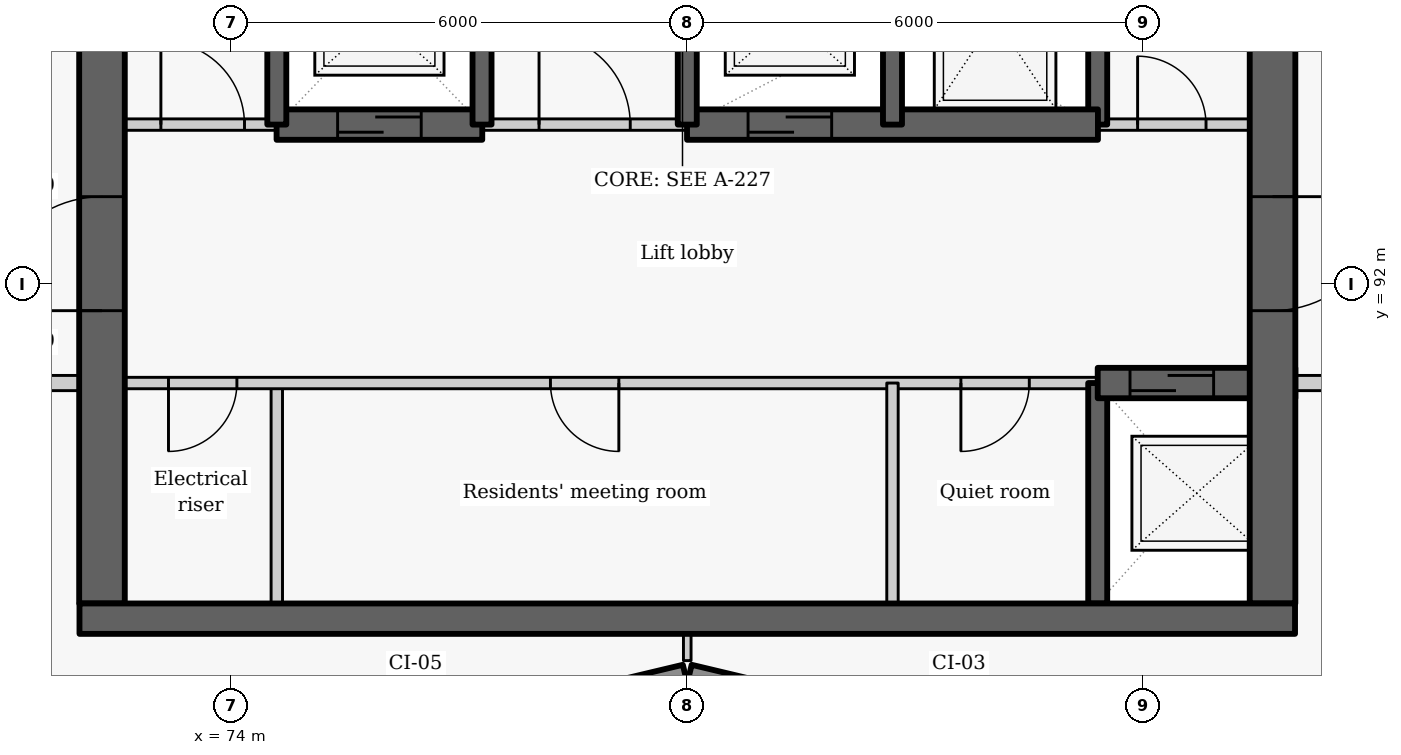
"""IFC4 building model, lengths in metres.
Left out: names, types, materials, properties, quantities, classifications, styles, units other than length and angle.
Written with IfcOpenShell. Run it as: python <this file> out.ifc"""

import sys

from ifc_helpers import new_model, si_unit, direction, frame, frame_2d, origin, place, context, subcontext, project, spatial, rectangle, extrude, element, fill, save


model = new_model("IFC4")
c1 = context("Model", 3, precision=1e-05, world=origin(), true_north=direction((0.0, 1.0)))
c2 = subcontext(c1, "Body", "Model", "MODEL_VIEW")
j1 = project(units=[si_unit("LENGTHUNIT", "METRE"), si_unit("PLANEANGLEUNIT", "RADIAN")], contexts=[c1])
p1 = place(None, origin())
s1 = spatial("IfcSite", under=j1, at=p1, CompositionType="ELEMENT")
p2 = place(p1, origin())
s2 = spatial("IfcBuilding", under=s1, at=p2, CompositionType="ELEMENT")
p3 = place(p2, frame((0.0, 0.0, 150.3)))
s3 = spatial("IfcBuildingStorey", under=s2, at=p3, CompositionType="ELEMENT", Elevation=150.3)
p4 = place(p3, frame((76.814, 86.119, 0.0), z_axis=(0.0, 0.0, 1.0), x_axis=(0.972773113459, 0.231759508395, 0.0)))
e1 = element("IfcWall", 1, at=p4, inside=s3, PredefinedType="SOLIDWALL", context=c2, shape_type="SweptSolid", body=[
    extrude(rectangle(XDim=3.246, YDim=0.25, at=frame_2d((1.623, 0.0))), origin(), (0.0, 0.0, 1.0), 2.425),
])
p5 = place(p4, frame((0.573, 0.0, 0.9)))
e2 = element("IfcOpeningElement", 2, at=p5, cuts=e1, PredefinedType="OPENING", context=c2, shape_type="SweptSolid", body=[
    extrude(rectangle(XDim=2.1, YDim=1.1, at=frame_2d((1.05, 0.55))), frame((0.0, 0.135, 0.0), z_axis=(0.0, -1.0, 0.0), x_axis=(1.0, 0.0, 0.0)), (0.0, 0.0, 1.0), 0.27),
])
p6 = place(p3, frame((80.029, 86.872, 0.0), z_axis=(0.0, 0.0, 1.0), x_axis=(0.972773113459, -0.231759508395, 0.0)))
e3 = element("IfcWall", 3, at=p6, inside=s3, PredefinedType="SOLIDWALL", context=c2, shape_type="SweptSolid", body=[
    extrude(rectangle(XDim=3.246, YDim=0.25, at=frame_2d((1.623, 0.0))), origin(), (0.0, 0.0, 1.0), 2.425),
])
p7 = place(p6, frame((0.573, 0.0, 0.9)))
e4 = element("IfcOpeningElement", 4, at=p7, cuts=e3, PredefinedType="OPENING", context=c2, shape_type="SweptSolid", body=[
    extrude(rectangle(XDim=2.1, YDim=1.1, at=frame_2d((1.05, 0.55))), frame((0.0, 0.135, 0.0), z_axis=(0.0, -1.0, 0.0), x_axis=(1.0, 0.0, 0.0)), (0.0, 0.0, 1.0), 0.27),
])
p8 = place(p3, frame((74.6, 87.8, 0.0), z_axis=(0.0, 0.0, 1.0), x_axis=(0.0, 1.0, 0.0)))
e5 = element("IfcWall", 5, at=p8, inside=s3, PredefinedType="PARTITIONING", context=c2, shape_type="SweptSolid", body=[
    extrude(rectangle(XDim=2.9, YDim=0.15, at=frame_2d((1.45, 0.0))), origin(), (0.0, 0.0, 1.0), 3.025),
])
p9 = place(p3, frame((85.4, 90.7, 0.0), z_axis=(0.0, 0.0, 1.0), x_axis=(-1.0, 0.0, 0.0)))
e6 = element("IfcWall", 6, at=p9, inside=s3, PredefinedType="PARTITIONING", context=c2, shape_type="SweptSolid", body=[
    extrude(rectangle(XDim=13.4, YDim=0.15, at=frame_2d((6.7, 0.0))), origin(), (0.0, 0.0, 1.0), 3.025),
])
p10 = place(p9, frame((11.325, 0.0, 0.0)))
e7 = element("IfcOpeningElement", 7, at=p10, cuts=e6, PredefinedType="OPENING", context=c2, shape_type="SweptSolid", body=[
    extrude(rectangle(XDim=0.9, YDim=2.1, at=frame_2d((0.45, 1.05))), frame((0.0, 0.085, 0.0), z_axis=(0.0, -1.0, 0.0), x_axis=(1.0, 0.0, 0.0)), (0.0, 0.0, 1.0), 0.17),
])
p11 = place(p9, frame((6.3, 0.0, 0.0)))
e8 = element("IfcOpeningElement", 8, at=p11, cuts=e6, PredefinedType="OPENING", context=c2, shape_type="SweptSolid", body=[
    extrude(rectangle(XDim=0.9, YDim=2.1, at=frame_2d((0.45, 1.05))), frame((0.0, 0.085, 0.0), z_axis=(0.0, -1.0, 0.0), x_axis=(1.0, 0.0, 0.0)), (0.0, 0.0, 1.0), 0.17),
])
p12 = place(p9, frame((0.9, 0.0, 0.0)))
e9 = element("IfcOpeningElement", 9, at=p12, cuts=e6, PredefinedType="OPENING", context=c2, shape_type="SweptSolid", body=[
    extrude(rectangle(XDim=0.9, YDim=2.1, at=frame_2d((0.45, 1.05))), frame((0.0, 0.085, 0.0), z_axis=(0.0, -1.0, 0.0), x_axis=(1.0, 0.0, 0.0)), (0.0, 0.0, 1.0), 0.17),
])
p13 = place(p3, frame((72.3, 87.8, -0.275), z_axis=(0.0, 0.0, 1.0), x_axis=(0.0, 1.0, 0.0)))
e10 = element("IfcWall", 10, at=p13, inside=s3, PredefinedType="SHEAR", context=c2, shape_type="SweptSolid", body=[
    extrude(rectangle(XDim=9.1, YDim=0.6, at=frame_2d((4.55, 0.0))), origin(), (0.0, 0.0, 1.0), 3.3),
])
p14 = place(p13, frame((3.852, 0.0, 0.275)))
e11 = element("IfcOpeningElement", 11, at=p14, cuts=e10, PredefinedType="OPENING", context=c2, shape_type="SweptSolid", body=[
    extrude(rectangle(XDim=1.5, YDim=2.1, at=frame_2d((0.75, 1.05))), frame((0.0, 0.31, 0.0), z_axis=(0.0, -1.0, 0.0), x_axis=(1.0, 0.0, 0.0)), (0.0, 0.0, 1.0), 0.62),
])
p15 = place(p3, frame((85.4, 87.8, -0.275), z_axis=(0.0, 0.0, 1.0), x_axis=(0.0, 1.0, 0.0)))
e12 = element("IfcWall", 12, at=p15, inside=s3, PredefinedType="SHEAR", context=c2, shape_type="SweptSolid", body=[
    extrude(rectangle(XDim=2.9, YDim=0.25, at=frame_2d((1.45, 0.0))), origin(), (0.0, 0.0, 1.0), 3.3),
])
p16 = place(p3, frame((85.4, 94.1, -0.275), z_axis=(0.0, 0.0, 1.0), x_axis=(0.0, 1.0, 0.0)))
e13 = element("IfcWall", 13, at=p16, inside=s3, PredefinedType="SHEAR", context=c2, shape_type="SweptSolid", body=[
    extrude(rectangle(XDim=2.8, YDim=0.25, at=frame_2d((1.4, 0.0))), origin(), (0.0, 0.0, 1.0), 3.3),
])
p17 = place(p3, frame((85.4, 90.7, -0.275), z_axis=(0.0, 0.0, 1.0), x_axis=(1.0, 0.0, 0.0)))
e14 = element("IfcWall", 14, at=p17, inside=s3, PredefinedType="SHEAR", context=c2, shape_type="SweptSolid", body=[
    extrude(rectangle(XDim=2.6, YDim=0.4, at=frame_2d((1.3, 0.0))), origin(), (0.0, 0.0, 1.0), 3.3),
])
p18 = place(p17, frame((0.425, 0.0, 0.275)))
e15 = element("IfcOpeningElement", 15, at=p18, cuts=e14, PredefinedType="OPENING", context=c2, shape_type="SweptSolid", body=[
    extrude(rectangle(XDim=1.1, YDim=2.1, at=frame_2d((0.55, 1.05))), frame((0.0, 0.21, 0.0), z_axis=(0.0, -1.0, 0.0), x_axis=(1.0, 0.0, 0.0)), (0.0, 0.0, 1.0), 0.42),
])
p19 = place(p3, frame((87.7, 103.4, -0.275), z_axis=(0.0, 0.0, 1.0), x_axis=(0.0, -1.0, 0.0)))
e16 = element("IfcWall", 16, at=p19, inside=s3, PredefinedType="SHEAR", context=c2, shape_type="SweptSolid", body=[
    extrude(rectangle(XDim=15.6, YDim=0.6, at=frame_2d((7.8, 0.0))), origin(), (0.0, 0.0, 1.0), 3.3),
])
p20 = place(p19, frame((10.248, 0.0, 0.275)))
e17 = element("IfcOpeningElement", 17, at=p20, cuts=e16, PredefinedType="OPENING", context=c2, shape_type="SweptSolid", body=[
    extrude(rectangle(XDim=1.5, YDim=2.1, at=frame_2d((0.75, 1.05))), frame((0.0, 0.31, 0.0), z_axis=(0.0, -1.0, 0.0), x_axis=(1.0, 0.0, 0.0)), (0.0, 0.0, 1.0), 0.62),
])
p21 = place(p3, frame((82.7, 87.8, 0.0), z_axis=(0.0, 0.0, 1.0), x_axis=(0.0, 1.0, 0.0)))
e18 = element("IfcWall", 18, at=p21, inside=s3, PredefinedType="PARTITIONING", context=c2, shape_type="SweptSolid", body=[
    extrude(rectangle(XDim=2.9, YDim=0.15, at=frame_2d((1.45, 0.0))), origin(), (0.0, 0.0, 1.0), 3.025),
])
p22 = place(p3, frame((72.0, 94.1, 0.0), z_axis=(0.0, 0.0, 1.0), x_axis=(1.0, 0.0, 0.0)))
e19 = element("IfcWall", 19, at=p22, inside=s3, PredefinedType="PARTITIONING", context=c2, shape_type="SweptSolid", body=[
    extrude(rectangle(XDim=2.603, YDim=0.15, at=frame_2d((1.302, 0.0))), origin(), (0.0, 0.0, 1.0), 3.025),
])
p23 = place(p22, frame((1.075, 0.0, 0.0)))
e20 = element("IfcOpeningElement", 20, at=p23, cuts=e19, PredefinedType="OPENING", context=c2, shape_type="SweptSolid", body=[
    extrude(rectangle(XDim=1.1, YDim=2.1, at=frame_2d((0.55, 1.05))), frame((0.0, 0.085, 0.0), z_axis=(0.0, -1.0, 0.0), x_axis=(1.0, 0.0, 0.0)), (0.0, 0.0, 1.0), 0.17),
])
p24 = place(p3, frame((77.297, 94.1, 0.0), z_axis=(0.0, 0.0, 1.0), x_axis=(1.0, 0.0, 0.0)))
e21 = element("IfcWall", 21, at=p24, inside=s3, PredefinedType="PARTITIONING", context=c2, shape_type="SweptSolid", body=[
    extrude(rectangle(XDim=2.706, YDim=0.15, at=frame_2d((1.353, 0.0))), origin(), (0.0, 0.0, 1.0), 3.025),
])
p25 = place(p24, frame((0.753, 0.0, 0.0)))
e22 = element("IfcOpeningElement", 22, at=p25, cuts=e21, PredefinedType="OPENING", context=c2, shape_type="SweptSolid", body=[
    extrude(rectangle(XDim=1.2, YDim=2.1, at=frame_2d((0.6, 1.05))), frame((0.0, 0.085, 0.0), z_axis=(0.0, -1.0, 0.0), x_axis=(1.0, 0.0, 0.0)), (0.0, 0.0, 1.0), 0.17),
])
p26 = place(p3, frame((85.397, 94.1, 0.0), z_axis=(0.0, 0.0, 1.0), x_axis=(1.0, 0.0, 0.0)))
e23 = element("IfcWall", 23, at=p26, inside=s3, PredefinedType="PARTITIONING", context=c2, shape_type="SweptSolid", body=[
    extrude(rectangle(XDim=2.603, YDim=0.15, at=frame_2d((1.302, 0.0))), origin(), (0.0, 0.0, 1.0), 3.025),
])
p27 = place(p26, frame((0.528, 0.0, 0.0)))
e24 = element("IfcOpeningElement", 24, at=p27, cuts=e23, PredefinedType="OPENING", context=c2, shape_type="SweptSolid", body=[
    extrude(rectangle(XDim=0.9, YDim=2.1, at=frame_2d((0.45, 1.05))), frame((0.0, 0.085, 0.0), z_axis=(0.0, -1.0, 0.0), x_axis=(1.0, 0.0, 0.0)), (0.0, 0.0, 1.0), 0.17),
])
p28 = place(p3, frame((74.597, 94.1, -0.275), z_axis=(0.0, 0.0, 1.0), x_axis=(1.0, 0.0, 0.0)))
e25 = element("IfcWall", 25, at=p28, inside=s3, PredefinedType="SHEAR", context=c2, shape_type="SweptSolid", body=[
    extrude(rectangle(XDim=2.706, YDim=0.4, at=frame_2d((1.353, 0.0))), origin(), (0.0, 0.0, 1.0), 3.3),
])
p29 = place(p28, frame((0.803, 0.0, 0.275)))
e26 = element("IfcOpeningElement", 26, at=p29, cuts=e25, PredefinedType="OPENING", context=c2, shape_type="SweptSolid", body=[
    extrude(rectangle(XDim=1.1, YDim=2.1, at=frame_2d((0.55, 1.05))), frame((0.0, 0.21, 0.0), z_axis=(0.0, -1.0, 0.0), x_axis=(1.0, 0.0, 0.0)), (0.0, 0.0, 1.0), 0.42),
])
p30 = place(p3, frame((79.997, 94.1, -0.275), z_axis=(0.0, 0.0, 1.0), x_axis=(1.0, 0.0, 0.0)))
e27 = element("IfcWall", 27, at=p30, inside=s3, PredefinedType="SHEAR", context=c2, shape_type="SweptSolid", body=[
    extrude(rectangle(XDim=5.406, YDim=0.4, at=frame_2d((2.703, 0.0))), origin(), (0.0, 0.0, 1.0), 3.3),
])
p31 = place(p30, frame((0.803, 0.0, 0.275)))
e28 = element("IfcOpeningElement", 28, at=p31, cuts=e27, PredefinedType="OPENING", context=c2, shape_type="SweptSolid", body=[
    extrude(rectangle(XDim=1.1, YDim=2.1, at=frame_2d((0.55, 1.05))), frame((0.0, 0.21, 0.0), z_axis=(0.0, -1.0, 0.0), x_axis=(1.0, 0.0, 0.0)), (0.0, 0.0, 1.0), 0.42),
])
for number, where, z_axis, x_axis in (
    (29, (74.6, 94.1, -0.275), (0.0, 0.0, 1.0), (0.0, 1.0, 0.0)),
    (30, (77.3, 94.1, -0.275), (0.0, 0.0, 1.0), (0.0, 1.0, 0.0)),
    (31, (80.0, 94.1, -0.275), (0.0, 0.0, 1.0), (0.0, 1.0, 0.0)),
    (32, (82.7, 94.1, -0.275), (0.0, 0.0, 1.0), (0.0, 1.0, 0.0)),
):
    element("IfcWall", number, at=place(p3, frame(where, z_axis=z_axis, x_axis=x_axis)), inside=s3, PredefinedType="SHEAR", context=c2, shape_type="SweptSolid", body=[
        extrude(rectangle(XDim=2.8, YDim=0.25, at=frame_2d((1.4, 0.0))), origin(), (0.0, 0.0, 1.0), 3.3),
    ])
for number, where, z_axis, x_axis in (
    (33, (70.45, 90.7, 0.0), (0.0, 0.0, 1.0), (1.0, 0.0, 0.0)),
    (34, (88.0, 90.7, 0.0), (0.0, 0.0, 1.0), (1.0, 0.0, 0.0)),
):
    element("IfcWall", number, at=place(p3, frame(where, z_axis=z_axis, x_axis=x_axis)), inside=s3, PredefinedType="PARTITIONING", context=c2, shape_type="SweptSolid", body=[
        extrude(rectangle(XDim=1.55, YDim=0.2, at=frame_2d((0.775, 0.0))), origin(), (0.0, 0.0, 1.0), 3.025),
    ])
p32 = place(p3, frame((80.0, 87.048, 0.0), z_axis=(0.0, 0.0, 1.0), x_axis=(0.0, 1.0, 0.0)))
e35 = element("IfcWall", 35, at=p32, inside=s3, PredefinedType="PARTITIONING", context=c2, shape_type="SweptSolid", body=[
    extrude(rectangle(XDim=0.352, YDim=0.1, at=frame_2d((0.176, 0.0))), origin(), (0.0, 0.0, 1.0), 3.025),
])
p33 = place(p3, frame((72.004, 87.6, -0.275), z_axis=(0.0, 0.0, 1.0), x_axis=(1.0, 0.0, 0.0)))
e36 = element("IfcWall", 36, at=p33, inside=s3, PredefinedType="SHEAR", context=c2, shape_type="SweptSolid", body=[
    extrude(rectangle(XDim=15.992, YDim=0.4, at=frame_2d((7.996, 0.0))), origin(), (0.0, 0.0, 1.0), 3.3),
])
p34 = place(p10, origin())
e37 = element("IfcDoor", 37, at=p34, inside=s3, OperationType="SINGLE_SWING_RIGHT", PredefinedType="DOOR", context=c2, shape_type="SweptSolid", body=[
    extrude(rectangle(XDim=0.9, YDim=2.1, at=frame_2d((0.45, 1.05))), frame((0.0, 0.025, 0.0), z_axis=(0.0, -1.0, 0.0), x_axis=(1.0, 0.0, 0.0)), (0.0, 0.0, 1.0), 0.05),
])
fill(e7, e37)
p35 = place(p18, origin())
e38 = element("IfcDoor", 38, at=p35, inside=s3, OperationType="SLIDING_TO_LEFT", PredefinedType="DOOR", context=c2, shape_type="SweptSolid", body=[
    extrude(rectangle(XDim=1.1, YDim=2.1, at=frame_2d((0.55, 1.05))), frame((0.0, 0.025, 0.0), z_axis=(0.0, -1.0, 0.0), x_axis=(1.0, 0.0, 0.0)), (0.0, 0.0, 1.0), 0.05),
])
fill(e15, e38)
p36 = place(p11, origin())
e39 = element("IfcDoor", 39, at=p36, inside=s3, OperationType="SINGLE_SWING_LEFT", PredefinedType="DOOR", context=c2, shape_type="SweptSolid", body=[
    extrude(rectangle(XDim=0.9, YDim=2.1, at=frame_2d((0.45, 1.05))), frame((0.0, 0.025, 0.0), z_axis=(0.0, -1.0, 0.0), x_axis=(1.0, 0.0, 0.0)), (0.0, 0.0, 1.0), 0.05),
])
fill(e8, e39)
p37 = place(p12, origin())
e40 = element("IfcDoor", 40, at=p37, inside=s3, OperationType="SINGLE_SWING_RIGHT", PredefinedType="DOOR", context=c2, shape_type="SweptSolid", body=[
    extrude(rectangle(XDim=0.9, YDim=2.1, at=frame_2d((0.45, 1.05))), frame((0.0, 0.025, 0.0), z_axis=(0.0, -1.0, 0.0), x_axis=(1.0, 0.0, 0.0)), (0.0, 0.0, 1.0), 0.05),
])
fill(e9, e40)
p38 = place(p23, origin())
e41 = element("IfcDoor", 41, at=p38, inside=s3, OperationType="SINGLE_SWING_LEFT", PredefinedType="DOOR", context=c2, shape_type="SweptSolid", body=[
    extrude(rectangle(XDim=1.1, YDim=2.1, at=frame_2d((0.55, 1.05))), frame((0.0, 0.025, 0.0), z_axis=(0.0, -1.0, 0.0), x_axis=(1.0, 0.0, 0.0)), (0.0, 0.0, 1.0), 0.05),
])
fill(e20, e41)
p39 = place(p29, origin())
e42 = element("IfcDoor", 42, at=p39, inside=s3, OperationType="SLIDING_TO_LEFT", PredefinedType="DOOR", context=c2, shape_type="SweptSolid", body=[
    extrude(rectangle(XDim=1.1, YDim=2.1, at=frame_2d((0.55, 1.05))), frame((0.0, 0.025, 0.0), z_axis=(0.0, -1.0, 0.0), x_axis=(1.0, 0.0, 0.0)), (0.0, 0.0, 1.0), 0.05),
])
fill(e26, e42)
p40 = place(p25, origin())
e43 = element("IfcDoor", 43, at=p40, inside=s3, OperationType="DOUBLE_DOOR_SINGLE_SWING", PredefinedType="DOOR", context=c2, shape_type="SweptSolid", body=[
    extrude(rectangle(XDim=1.2, YDim=2.1, at=frame_2d((0.6, 1.05))), frame((0.0, 0.025, 0.0), z_axis=(0.0, -1.0, 0.0), x_axis=(1.0, 0.0, 0.0)), (0.0, 0.0, 1.0), 0.05),
])
fill(e22, e43)
p41 = place(p31, origin())
e44 = element("IfcDoor", 44, at=p41, inside=s3, OperationType="SLIDING_TO_LEFT", PredefinedType="DOOR", context=c2, shape_type="SweptSolid", body=[
    extrude(rectangle(XDim=1.1, YDim=2.1, at=frame_2d((0.55, 1.05))), frame((0.0, 0.025, 0.0), z_axis=(0.0, -1.0, 0.0), x_axis=(1.0, 0.0, 0.0)), (0.0, 0.0, 1.0), 0.05),
])
fill(e28, e44)
p42 = place(p27, origin())
e45 = element("IfcDoor", 45, at=p42, inside=s3, OperationType="SINGLE_SWING_LEFT", PredefinedType="DOOR", context=c2, shape_type="SweptSolid", body=[
    extrude(rectangle(XDim=0.9, YDim=2.1, at=frame_2d((0.45, 1.05))), frame((0.0, 0.025, 0.0), z_axis=(0.0, -1.0, 0.0), x_axis=(1.0, 0.0, 0.0)), (0.0, 0.0, 1.0), 0.05),
])
fill(e24, e45)
p43 = place(p20, origin())
e46 = element("IfcDoor", 46, at=p43, inside=s3, OperationType="DOUBLE_DOOR_SINGLE_SWING", PredefinedType="DOOR", context=c2, shape_type="SweptSolid", body=[
    extrude(rectangle(XDim=1.5, YDim=2.1, at=frame_2d((0.75, 1.05))), frame((0.0, 0.025, 0.0), z_axis=(0.0, -1.0, 0.0), x_axis=(1.0, 0.0, 0.0)), (0.0, 0.0, 1.0), 0.05),
])
fill(e17, e46)
p44 = place(p14, origin())
e47 = element("IfcDoor", 47, at=p44, inside=s3, OperationType="DOUBLE_DOOR_SINGLE_SWING", PredefinedType="DOOR", context=c2, shape_type="SweptSolid", body=[
    extrude(rectangle(XDim=1.5, YDim=2.1, at=frame_2d((0.75, 1.05))), frame((0.0, 0.025, 0.0), z_axis=(0.0, -1.0, 0.0), x_axis=(1.0, 0.0, 0.0)), (0.0, 0.0, 1.0), 0.05),
])
fill(e11, e47)
save(model, sys.argv[1])
